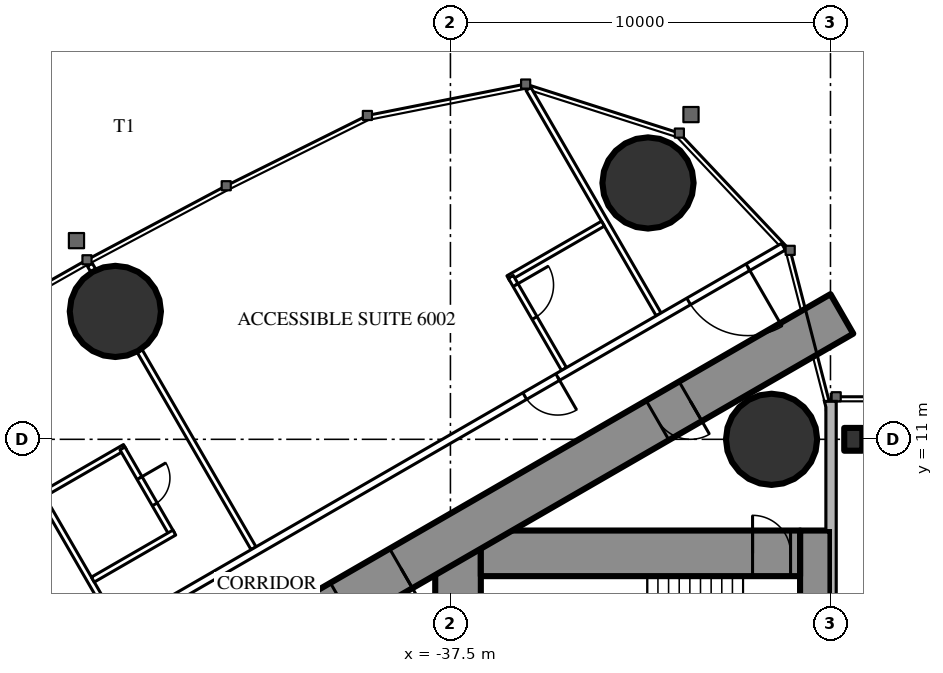
"""IFC4 building model, lengths in metres.
Left out: names, types, materials, properties, quantities, classifications, styles, units other than length and angle.
Written with IfcOpenShell. Run it as: python <this file> out.ifc"""

import sys

from ifc_helpers import new_model, si_unit, direction, frame, frame_2d, origin, origin_2d, place, context, subcontext, project, spatial, rectangle, circle, i_section, extrude, element, fill, save


model = new_model("IFC4")
c1 = context("Model", 3, precision=1e-05, world=origin(), true_north=direction((0.0, 1.0)))
c2 = subcontext(c1, "Body", "Model", "MODEL_VIEW")
j1 = project(units=[si_unit("LENGTHUNIT", "METRE"), si_unit("PLANEANGLEUNIT", "RADIAN")], contexts=[c1])
p1 = place(None, origin())
s1 = spatial("IfcSite", under=j1, at=p1, CompositionType="ELEMENT")
p2 = place(p1, origin())
s2 = spatial("IfcBuilding", under=s1, at=p2, CompositionType="ELEMENT")
p3 = place(p2, frame((0.0, 0.0, 226.1)))
s3 = spatial("IfcBuildingStorey", under=s2, at=p3, CompositionType="ELEMENT", Elevation=226.1)
for number, where, z_axis, x_axis in (
    (1, (-32.301, 17.745, 0.0), (0.0, 0.0, 1.0), (1.0, 0.0, 0.0)),
    (2, (-29.05, 11.0, 0.0), (0.0, 0.0, 1.0), (1.0, 0.0, 0.0)),
    (3, (-46.317, 14.365, 0.0), (0.0, 0.0, 1.0), (1.0, 0.0, 0.0)),
):
    element("IfcColumn", number, at=place(p3, frame(where, z_axis=z_axis, x_axis=x_axis)), inside=s3, PredefinedType="COLUMN", context=c2, shape_type="SweptSolid", body=[
        extrude(circle(Radius=1.2, at=origin_2d()), origin(), (0.0, 0.0, 1.0), 3.6),
    ])
p4 = place(p3, frame((-27.9, 8.6, 0.0), z_axis=(0.0, 0.0, 1.0), x_axis=(0.0, -1.0, 0.0)))
e4 = element("IfcWall", 4, at=p4, inside=s3, PredefinedType="SHEAR", context=c2, shape_type="SweptSolid", body=[
    extrude(rectangle(XDim=17.2, YDim=0.8, at=frame_2d((8.6, 0.0))), origin(), (0.0, 0.0, 1.0), 3.6),
])
p5 = place(p4, frame((6.95, 0.0, 0.0)))
e5 = element("IfcOpeningElement", 5, at=p5, cuts=e4, PredefinedType="OPENING", context=c2, shape_type="SweptSolid", body=[
    extrude(rectangle(XDim=0.9, YDim=2.2, at=frame_2d((0.45, 1.1))), frame((0.0, 0.41, 0.0), z_axis=(0.0, -1.0, 0.0), x_axis=(1.0, 0.0, 0.0)), (0.0, 0.0, 1.0), 0.82),
])
p6 = place(p3, frame((-37.3, 8.6, 0.0), z_axis=(0.0, 0.0, 1.0), x_axis=(0.0, -1.0, 0.0)))
e6 = element("IfcWall", 6, at=p6, inside=s3, PredefinedType="SHEAR", context=c2, shape_type="SweptSolid", body=[
    extrude(rectangle(XDim=17.2, YDim=1.2, at=frame_2d((8.6, 0.0))), origin(), (0.0, 0.0, 1.0), 3.6),
])
p7 = place(p6, frame((7.7, 0.0, 0.0)))
e7 = element("IfcOpeningElement", 7, at=p7, cuts=e6, PredefinedType="OPENING", context=c2, shape_type="SweptSolid", body=[
    extrude(rectangle(XDim=1.8, YDim=2.2, at=frame_2d((0.9, 1.1))), frame((0.0, 0.61, 0.0), z_axis=(0.0, -1.0, 0.0), x_axis=(1.0, 0.0, 0.0)), (0.0, 0.0, 1.0), 1.22),
])
p8 = place(p3, frame((-28.3, 8.0, 0.0), z_axis=(0.0, 0.0, 1.0), x_axis=(-1.0, 0.0, 0.0)))
e8 = element("IfcWall", 8, at=p8, inside=s3, PredefinedType="SHEAR", context=c2, shape_type="SweptSolid", body=[
    extrude(rectangle(XDim=8.4, YDim=1.2, at=frame_2d((4.2, 0.0))), origin(), (0.0, 0.0, 1.0), 3.6),
])
p9 = place(p8, frame((0.25, 0.0, 0.0)))
e9 = element("IfcOpeningElement", 9, at=p9, cuts=e8, PredefinedType="OPENING", context=c2, shape_type="SweptSolid", body=[
    extrude(rectangle(XDim=1.0, YDim=2.2, at=frame_2d((0.5, 1.1))), frame((0.0, 0.61, 0.0), z_axis=(0.0, -1.0, 0.0), x_axis=(1.0, 0.0, 0.0)), (0.0, 0.0, 1.0), 1.22),
])
p10 = place(p3, frame((-27.2, 14.3, 0.0), z_axis=(0.0, 0.0, 1.0), x_axis=(-0.866026593062, -0.499997940104, 0.0)))
e10 = element("IfcWall", 10, at=p10, inside=s3, PredefinedType="SHEAR", context=c2, shape_type="SweptSolid", body=[
    extrude(rectangle(XDim=28.946, YDim=1.2, at=frame_2d((14.473, 0.0))), origin(), (0.0, 0.0, 1.0), 3.6),
])
p11 = place(p10, frame((4.6, 0.0, 0.0)))
e11 = element("IfcOpeningElement", 11, at=p11, cuts=e10, PredefinedType="OPENING", context=c2, shape_type="SweptSolid", body=[
    extrude(rectangle(XDim=1.0, YDim=2.2, at=frame_2d((0.5, 1.1))), frame((0.0, 0.61, 0.0), z_axis=(0.0, -1.0, 0.0), x_axis=(1.0, 0.0, 0.0)), (0.0, 0.0, 1.0), 1.22),
])
p12 = place(p10, frame((13.395, 0.0, 0.0)))
e12 = element("IfcOpeningElement", 12, at=p12, cuts=e10, PredefinedType="OPENING", context=c2, shape_type="SweptSolid", body=[
    extrude(rectangle(XDim=1.8, YDim=2.2, at=frame_2d((0.9, 1.1))), frame((0.0, 0.61, 0.0), z_axis=(0.0, -1.0, 0.0), x_axis=(1.0, 0.0, 0.0)), (0.0, 0.0, 1.0), 1.22),
])
p13 = place(p3, frame((-26.9, 11.0, 0.0), z_axis=(0.0, 0.0, 1.0), x_axis=(1.0, 0.0, 0.0)))
e13 = element("IfcColumn", 13, at=p13, inside=s3, PredefinedType="COLUMN", context=c2, shape_type="SweptSolid", body=[
    extrude(i_section(OverallWidth=0.476, OverallDepth=0.6, WebThickness=0.1, FlangeThickness=0.14, FilletRadius=0.02, at=origin_2d()), origin(), (0.0, 0.0, 1.0), 3.6),
])
p14 = place(p3, frame((-32.022, 14.287, 0.0), z_axis=(0.0, 0.0, 1.0), x_axis=(-0.50000019414, 0.866025291697, 0.0)))
e14 = element("IfcWall", 14, at=p14, inside=s3, PredefinedType="PARTITIONING", context=c2, shape_type="SweptSolid", body=[
    extrude(rectangle(XDim=6.848, YDim=0.15, at=frame_2d((3.424, 0.0))), origin(), (0.0, 0.0, 1.0), 3.35),
])
p15 = place(p3, frame((-42.68, 8.134, 0.0), z_axis=(0.0, 0.0, 1.0), x_axis=(-0.499984479505, 0.866034364361, 0.0)))
e15 = element("IfcWall", 15, at=p15, inside=s3, PredefinedType="PARTITIONING", context=c2, shape_type="SweptSolid", body=[
    extrude(rectangle(XDim=5.995, YDim=0.15, at=frame_2d((2.998, 0.0))), origin(), (0.0, 0.0, 1.0), 2.45),
])
p16 = place(p3, frame((-46.898, 15.439, 0.0), z_axis=(0.0, 0.0, 1.0), x_axis=(-0.500232303069, 0.865891241997, 0.0)))
e16 = element("IfcWall", 16, at=p16, inside=s3, PredefinedType="PARTITIONING", context=c2, shape_type="SweptSolid", body=[
    extrude(rectangle(XDim=0.18, YDim=0.15, at=frame_2d((0.09, 0.0))), origin(), (0.0, 0.0, 1.0), 2.45),
])
p17 = place(p3, frame((-46.224, 5.972, 0.0), z_axis=(0.0, 0.0, 1.0), x_axis=(-0.500021351822, 0.866013075953, 0.0)))
e17 = element("IfcWall", 17, at=p17, inside=s3, PredefinedType="PARTITIONING", context=c2, shape_type="SweptSolid", body=[
    extrude(rectangle(XDim=6.128, YDim=0.15, at=frame_2d((3.064, 0.0))), origin(), (0.0, 0.0, 1.0), 2.45),
])
p18 = place(p3, frame((-33.487, 16.675, 0.0), z_axis=(0.0, 0.0, 1.0), x_axis=(-0.866039941686, -0.499974818771, 0.0)))
e18 = element("IfcWall", 18, at=p18, inside=s3, PredefinedType="PARTITIONING", context=c2, shape_type="SweptSolid", body=[
    extrude(rectangle(XDim=2.875, YDim=0.15, at=frame_2d((1.438, 0.0))), origin(), (0.0, 0.0, 1.0), 3.35),
])
p19 = place(p3, frame((-34.511, 12.85, 0.0), z_axis=(0.0, 0.0, 1.0), x_axis=(-0.500011755427, 0.866018616679, 0.0)))
e19 = element("IfcWall", 19, at=p19, inside=s3, PredefinedType="PARTITIONING", context=c2, shape_type="SweptSolid", body=[
    extrude(rectangle(XDim=2.8, YDim=0.15, at=frame_2d((1.4, 0.0))), origin(), (0.0, 0.0, 1.0), 3.35),
])
p20 = place(p19, frame((1.55, 0.0, 0.0)))
e20 = element("IfcOpeningElement", 20, at=p20, cuts=e19, PredefinedType="OPENING", context=c2, shape_type="SweptSolid", body=[
    extrude(rectangle(XDim=1.0, YDim=2.2, at=frame_2d((0.5, 1.1))), frame((0.0, 0.085, 0.0), z_axis=(0.0, -1.0, 0.0), x_axis=(1.0, 0.0, 0.0)), (0.0, 0.0, 1.0), 0.17),
])
p21 = place(p3, frame((-46.065, 10.798, 0.0), z_axis=(0.0, 0.0, 1.0), x_axis=(-0.866031185235, -0.4999899861, 0.0)))
e21 = element("IfcWall", 21, at=p21, inside=s3, PredefinedType="PARTITIONING", context=c2, shape_type="SweptSolid", body=[
    extrude(rectangle(XDim=2.475, YDim=0.15, at=frame_2d((1.238, 0.0))), origin(), (0.0, 0.0, 1.0), 3.35),
])
p22 = place(p3, frame((-44.83, 8.509, 0.0), z_axis=(0.0, 0.0, 1.0), x_axis=(-0.499936506574, 0.866062058628, 0.0)))
e22 = element("IfcWall", 22, at=p22, inside=s3, PredefinedType="PARTITIONING", context=c2, shape_type="SweptSolid", body=[
    extrude(rectangle(XDim=2.6, YDim=0.15, at=frame_2d((1.3, 0.0))), origin(), (0.0, 0.0, 1.0), 3.35),
])
p23 = place(p22, frame((0.9, 0.0, 0.0)))
e23 = element("IfcOpeningElement", 23, at=p23, cuts=e22, PredefinedType="OPENING", context=c2, shape_type="SweptSolid", body=[
    extrude(rectangle(XDim=0.8, YDim=2.2, at=frame_2d((0.4, 1.1))), frame((0.0, 0.085, 0.0), z_axis=(0.0, -1.0, 0.0), x_axis=(1.0, 0.0, 0.0)), (0.0, 0.0, 1.0), 0.17),
])
p24 = place(p3, frame((-44.765, 8.546, 0.0), z_axis=(0.0, 0.0, 1.0), x_axis=(-0.86604923931, -0.499958713387, 0.0)))
e24 = element("IfcWall", 24, at=p24, inside=s3, PredefinedType="PARTITIONING", context=c2, shape_type="SweptSolid", body=[
    extrude(rectangle(XDim=2.475, YDim=0.15, at=frame_2d((1.237, 0.0))), origin(), (0.0, 0.0, 1.0), 3.35),
])
p25 = place(p3, frame((-28.737, 16.068, 0.0), z_axis=(0.0, 0.0, 1.0), x_axis=(-0.866023901326, -0.500002602325, 0.0)))
e25 = element("IfcWall", 25, at=p25, inside=s3, PredefinedType="PARTITIONING", context=c2, shape_type="SweptSolid", body=[
    extrude(rectangle(XDim=20.192, YDim=0.2, at=frame_2d((10.096, 0.0))), origin(), (0.0, 0.0, 1.0), 3.35),
])
p26 = place(p25, frame((1.08, 0.0, 0.0)))
e26 = element("IfcOpeningElement", 26, at=p26, cuts=e25, PredefinedType="OPENING", context=c2, shape_type="SweptSolid", body=[
    extrude(rectangle(XDim=1.8, YDim=2.04, at=frame_2d((0.9, 1.02))), frame((0.0, 0.11, 0.0), z_axis=(0.0, -1.0, 0.0), x_axis=(1.0, 0.0, 0.0)), (0.0, 0.0, 1.0), 0.22),
])
p27 = place(p25, frame((6.86, 0.0, 0.0)))
e27 = element("IfcOpeningElement", 27, at=p27, cuts=e25, PredefinedType="OPENING", context=c2, shape_type="SweptSolid", body=[
    extrude(rectangle(XDim=1.0, YDim=2.2, at=frame_2d((0.5, 1.1))), frame((0.0, 0.11, 0.0), z_axis=(0.0, -1.0, 0.0), x_axis=(1.0, 0.0, 0.0)), (0.0, 0.0, 1.0), 0.22),
])
p28 = place(p25, frame((18.867, 0.0, 0.0)))
e28 = element("IfcOpeningElement", 28, at=p28, cuts=e25, PredefinedType="OPENING", context=c2, shape_type="SweptSolid", body=[
    extrude(rectangle(XDim=0.95, YDim=2.2, at=frame_2d((0.475, 1.1))), frame((0.0, 0.11, 0.0), z_axis=(0.0, -1.0, 0.0), x_axis=(1.0, 0.0, 0.0)), (0.0, 0.0, 1.0), 0.22),
])
p29 = place(p26, origin())
e29 = element("IfcDoor", 29, at=p29, inside=s3, OperationType="DOUBLE_DOOR_SINGLE_SWING", PredefinedType="DOOR", context=c2, shape_type="SweptSolid", body=[
    extrude(rectangle(XDim=1.8, YDim=2.04, at=frame_2d((0.9, 1.02))), frame((0.0, 0.025, 0.0), z_axis=(0.0, -1.0, 0.0), x_axis=(1.0, 0.0, 0.0)), (0.0, 0.0, 1.0), 0.05),
])
fill(e26, e29)
p30 = place(p20, origin())
e30 = element("IfcDoor", 30, at=p30, inside=s3, OperationType="SINGLE_SWING_RIGHT", PredefinedType="DOOR", context=c2, shape_type="SweptSolid", body=[
    extrude(rectangle(XDim=1.0, YDim=2.2, at=frame_2d((0.5, 1.1))), frame((0.0, 0.025, 0.0), z_axis=(0.0, -1.0, 0.0), x_axis=(1.0, 0.0, 0.0)), (0.0, 0.0, 1.0), 0.05),
])
fill(e20, e30)
p31 = place(p27, origin())
e31 = element("IfcDoor", 31, at=p31, inside=s3, OperationType="SINGLE_SWING_LEFT", PredefinedType="DOOR", context=c2, shape_type="SweptSolid", body=[
    extrude(rectangle(XDim=1.0, YDim=2.2, at=frame_2d((0.5, 1.1))), frame((0.0, 0.025, 0.0), z_axis=(0.0, -1.0, 0.0), x_axis=(1.0, 0.0, 0.0)), (0.0, 0.0, 1.0), 0.05),
])
fill(e27, e31)
p32 = place(p23, origin())
e32 = element("IfcDoor", 32, at=p32, inside=s3, OperationType="SINGLE_SWING_RIGHT", PredefinedType="DOOR", context=c2, shape_type="SweptSolid", body=[
    extrude(rectangle(XDim=0.8, YDim=2.2, at=frame_2d((0.4, 1.1))), frame((0.0, 0.025, 0.0), z_axis=(0.0, -1.0, 0.0), x_axis=(1.0, 0.0, 0.0)), (0.0, 0.0, 1.0), 0.05),
])
fill(e23, e32)
p33 = place(p11, origin())
e33 = element("IfcDoor", 33, at=p33, inside=s3, OperationType="SINGLE_SWING_LEFT", PredefinedType="DOOR", context=c2, shape_type="SweptSolid", body=[
    extrude(rectangle(XDim=1.0, YDim=2.2, at=frame_2d((0.5, 1.1))), frame((0.0, 0.025, 0.0), z_axis=(0.0, -1.0, 0.0), x_axis=(1.0, 0.0, 0.0)), (0.0, 0.0, 1.0), 0.05),
])
fill(e11, e33)
p34 = place(p12, origin())
e34 = element("IfcDoor", 34, at=p34, inside=s3, OperationType="DOUBLE_DOOR_SINGLE_SWING", PredefinedType="DOOR", context=c2, shape_type="SweptSolid", body=[
    extrude(rectangle(XDim=1.8, YDim=2.2, at=frame_2d((0.9, 1.1))), frame((0.0, 0.025, 0.0), z_axis=(0.0, -1.0, 0.0), x_axis=(1.0, 0.0, 0.0)), (0.0, 0.0, 1.0), 0.05),
])
fill(e12, e34)
p35 = place(p9, origin())
e35 = element("IfcDoor", 35, at=p35, inside=s3, OperationType="SINGLE_SWING_RIGHT", PredefinedType="DOOR", context=c2, shape_type="SweptSolid", body=[
    extrude(rectangle(XDim=1.0, YDim=2.2, at=frame_2d((0.5, 1.1))), frame((0.0, 0.025, 0.0), z_axis=(0.0, -1.0, 0.0), x_axis=(1.0, 0.0, 0.0)), (0.0, 0.0, 1.0), 0.05),
])
fill(e9, e35)
save(model, sys.argv[1])
